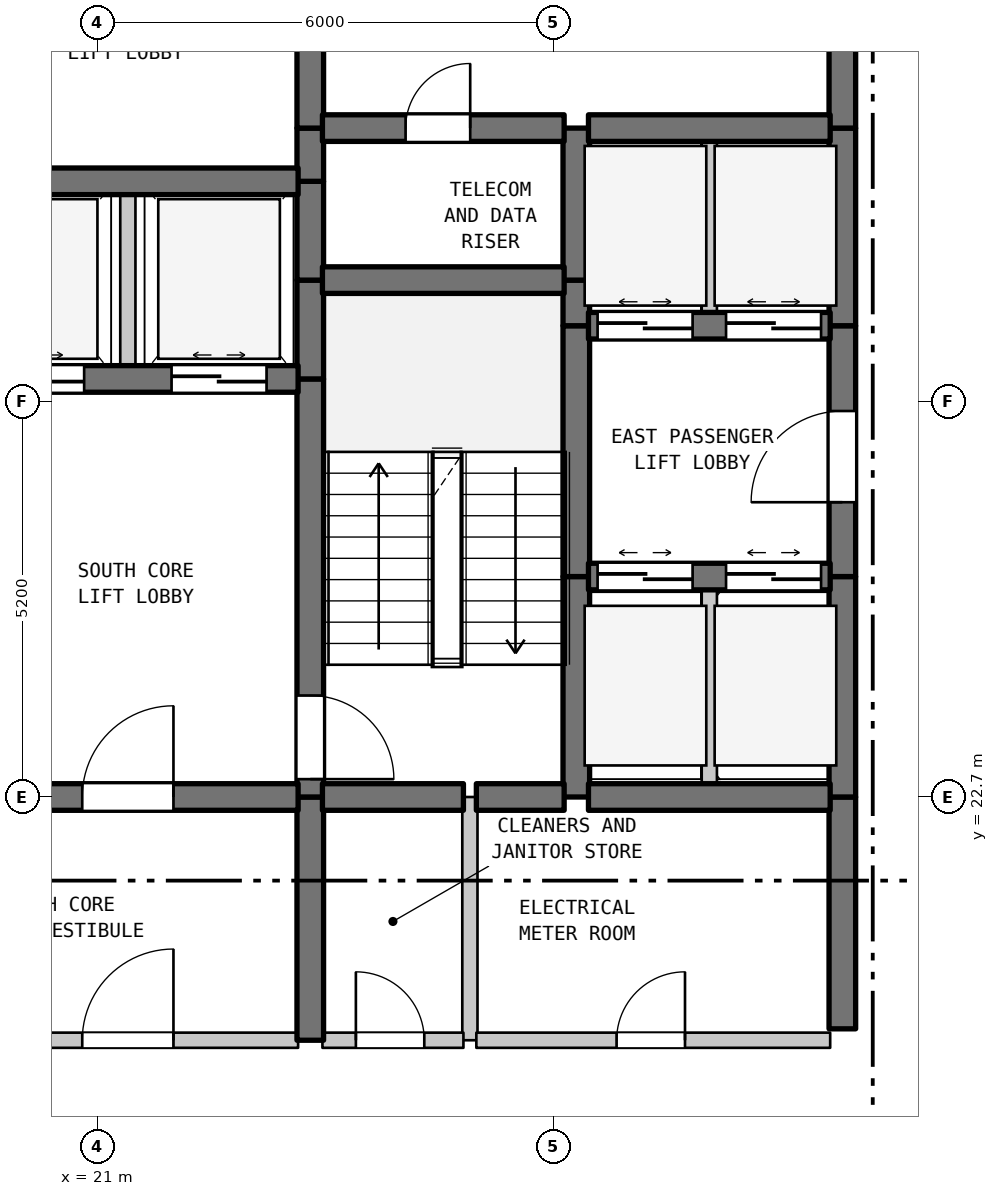
"""IFC4 building model, lengths in metres.
Left out: names, types, materials, properties, quantities, classifications, styles, units other than length and angle.
Written with IfcOpenShell. Run it as: python <this file> out.ifc"""

import sys

from ifc_helpers import new_model, si_unit, direction, frame, frame_2d, origin, place, context, subcontext, project, spatial, rectangle, extrude, element, fill, save


model = new_model("IFC4")
c1 = context("Model", 3, precision=1e-05, world=origin(), true_north=direction((0.0, 1.0)))
c2 = subcontext(c1, "Body", "Model", "MODEL_VIEW")
j1 = project(units=[si_unit("LENGTHUNIT", "METRE"), si_unit("PLANEANGLEUNIT", "RADIAN")], contexts=[c1])
p1 = place(None, origin())
s1 = spatial("IfcSite", under=j1, at=p1, CompositionType="ELEMENT")
p2 = place(p1, origin())
s2 = spatial("IfcBuilding", under=s1, at=p2, CompositionType="ELEMENT")
p3 = place(p2, frame((0.0, 0.0, 31.4)))
s3 = spatial("IfcBuildingStorey", under=s2, at=p3, CompositionType="ELEMENT", Elevation=31.4)
p4 = place(p3, frame((21.4, 28.2, 0.0), z_axis=(0.0, 0.0, 1.0), x_axis=(0.0, 1.0, 0.0)))
e1 = element("IfcWall", 1, at=p4, inside=s3, PredefinedType="STANDARD", context=c2, shape_type="SweptSolid", body=[
    extrude(rectangle(XDim=2.6, YDim=0.2, at=frame_2d((1.3, 0.0))), origin(), (0.0, 0.0, 1.0), 3.385),
])
p5 = place(p3, frame((23.8, 19.5, 0.0), z_axis=(0.0, 0.0, 1.0), x_axis=(0.0, 1.0, 0.0)))
e2 = element("IfcWall", 2, at=p5, inside=s3, PredefinedType="SHEAR", context=c2, shape_type="SweptSolid", body=[
    extrude(rectangle(XDim=3.2, YDim=0.35, at=frame_2d((1.6, 0.0))), origin(), (0.0, 0.0, 1.0), 3.385),
])
p6 = place(p3, frame((23.8, 22.7, 0.0), z_axis=(0.0, 0.0, 1.0), x_axis=(0.0, 1.0, 0.0)))
e3 = element("IfcWall", 3, at=p6, inside=s3, PredefinedType="SHEAR", context=c2, shape_type="SweptSolid", body=[
    extrude(rectangle(XDim=5.5, YDim=0.35, at=frame_2d((2.75, 0.0))), origin(), (0.0, 0.0, 1.0), 3.385),
])
p7 = place(p6, frame((0.235, 0.0, 0.0)))
e4 = element("IfcOpeningElement", 4, at=p7, cuts=e3, PredefinedType="OPENING", context=c2, shape_type="SweptSolid", body=[
    extrude(rectangle(XDim=1.1, YDim=2.15, at=frame_2d((0.55, 1.075))), frame((0.0, 0.185, 0.0), z_axis=(0.0, -1.0, 0.0), x_axis=(1.0, 0.0, 0.0)), (0.0, 0.0, 1.0), 0.37),
])
for number, where, z_axis, x_axis in (
    (5, (23.8, 28.2, 0.0), (0.0, 0.0, 1.0), (0.0, 1.0, 0.0)),
    (6, (23.8, 29.5, 0.0), (0.0, 0.0, 1.0), (0.0, 1.0, 0.0)),
):
    element("IfcWall", number, at=place(p3, frame(where, z_axis=z_axis, x_axis=x_axis)), inside=s3, PredefinedType="SHEAR", context=c2, shape_type="SweptSolid", body=[
        extrude(rectangle(XDim=1.3, YDim=0.35, at=frame_2d((0.65, 0.0))), origin(), (0.0, 0.0, 1.0), 3.385),
    ])
p8 = place(p3, frame((23.8, 30.8, 0.0), z_axis=(0.0, 0.0, 1.0), x_axis=(0.0, 1.0, 0.0)))
e7 = element("IfcWall", 7, at=p8, inside=s3, PredefinedType="SHEAR", context=c2, shape_type="SweptSolid", body=[
    extrude(rectangle(XDim=0.7, YDim=0.35, at=frame_2d((0.35, 0.0))), origin(), (0.0, 0.0, 1.0), 3.385),
])
p9 = place(p3, frame((23.8, 31.5, 0.0), z_axis=(0.0, 0.0, 1.0), x_axis=(0.0, 1.0, 0.0)))
e8 = element("IfcWall", 8, at=p9, inside=s3, PredefinedType="SHEAR", context=c2, shape_type="SweptSolid", body=[
    extrude(rectangle(XDim=3.5, YDim=0.35, at=frame_2d((1.75, 0.0))), origin(), (0.0, 0.0, 1.0), 3.385),
])
p10 = place(p9, frame((1.127, 0.0, 0.0)))
e9 = element("IfcOpeningElement", 9, at=p10, cuts=e8, PredefinedType="OPENING", context=c2, shape_type="SweptSolid", body=[
    extrude(rectangle(XDim=1.1, YDim=2.15, at=frame_2d((0.55, 1.075))), frame((0.0, 0.185, 0.0), z_axis=(0.0, -1.0, 0.0), x_axis=(1.0, 0.0, 0.0)), (0.0, 0.0, 1.0), 0.37),
])
p11 = place(p3, frame((25.9, 19.5, 0.0), z_axis=(0.0, 0.0, 1.0), x_axis=(0.0, 1.0, 0.0)))
e10 = element("IfcWall", 10, at=p11, inside=s3, PredefinedType="STANDARD", context=c2, shape_type="SweptSolid", body=[
    extrude(rectangle(XDim=3.2, YDim=0.2, at=frame_2d((1.6, 0.0))), origin(), (0.0, 0.0, 1.0), 3.385),
])
p12 = place(p3, frame((27.3, 22.7, 0.0), z_axis=(0.0, 0.0, 1.0), x_axis=(0.0, 1.0, 0.0)))
e11 = element("IfcWall", 11, at=p12, inside=s3, PredefinedType="SHEAR", context=c2, shape_type="SweptSolid", body=[
    extrude(rectangle(XDim=2.9, YDim=0.35, at=frame_2d((1.45, 0.0))), origin(), (0.0, 0.0, 1.0), 3.385),
])
p13 = place(p3, frame((27.3, 25.6, 0.0), z_axis=(0.0, 0.0, 1.0), x_axis=(0.0, 1.0, 0.0)))
e12 = element("IfcWall", 12, at=p13, inside=s3, PredefinedType="SHEAR", context=c2, shape_type="SweptSolid", body=[
    extrude(rectangle(XDim=3.3, YDim=0.35, at=frame_2d((1.65, 0.0))), origin(), (0.0, 0.0, 1.0), 3.385),
])
p14 = place(p3, frame((27.3, 28.9, 0.0), z_axis=(0.0, 0.0, 1.0), x_axis=(0.0, 1.0, 0.0)))
e13 = element("IfcWall", 13, at=p14, inside=s3, PredefinedType="SHEAR", context=c2, shape_type="SweptSolid", body=[
    extrude(rectangle(XDim=0.6, YDim=0.35, at=frame_2d((0.3, 0.0))), origin(), (0.0, 0.0, 1.0), 3.385),
])
p15 = place(p3, frame((27.3, 29.5, 0.0), z_axis=(0.0, 0.0, 1.0), x_axis=(0.0, 1.0, 0.0)))
e14 = element("IfcWall", 14, at=p15, inside=s3, PredefinedType="SHEAR", context=c2, shape_type="SweptSolid", body=[
    extrude(rectangle(XDim=2.0, YDim=0.35, at=frame_2d((1.0, 0.0))), origin(), (0.0, 0.0, 1.0), 3.385),
])
p16 = place(p3, frame((29.05, 22.7, 0.0), z_axis=(0.0, 0.0, 1.0), x_axis=(0.0, 1.0, 0.0)))
e15 = element("IfcWall", 15, at=p16, inside=s3, PredefinedType="STANDARD", context=c2, shape_type="SweptSolid", body=[
    extrude(rectangle(XDim=2.9, YDim=0.2, at=frame_2d((1.45, 0.0))), origin(), (0.0, 0.0, 1.0), 3.385),
])
p17 = place(p3, frame((29.05, 28.9, 0.0), z_axis=(0.0, 0.0, 1.0), x_axis=(0.0, 1.0, 0.0)))
e16 = element("IfcWall", 16, at=p17, inside=s3, PredefinedType="STANDARD", context=c2, shape_type="SweptSolid", body=[
    extrude(rectangle(XDim=2.6, YDim=0.2, at=frame_2d((1.3, 0.0))), origin(), (0.0, 0.0, 1.0), 3.385),
])
p18 = place(p3, frame((30.8, 19.65, 0.0), z_axis=(0.0, 0.0, 1.0), x_axis=(0.0, 1.0, 0.0)))
e17 = element("IfcWall", 17, at=p18, inside=s3, PredefinedType="SHEAR", context=c2, shape_type="SweptSolid", body=[
    extrude(rectangle(XDim=3.05, YDim=0.35, at=frame_2d((1.525, 0.0))), origin(), (0.0, 0.0, 1.0), 3.385),
])
p19 = place(p3, frame((30.8, 22.7, 0.0), z_axis=(0.0, 0.0, 1.0), x_axis=(0.0, 1.0, 0.0)))
e18 = element("IfcWall", 18, at=p19, inside=s3, PredefinedType="SHEAR", context=c2, shape_type="SweptSolid", body=[
    extrude(rectangle(XDim=2.9, YDim=0.35, at=frame_2d((1.45, 0.0))), origin(), (0.0, 0.0, 1.0), 3.385),
])
p20 = place(p3, frame((30.8, 25.6, 0.0), z_axis=(0.0, 0.0, 1.0), x_axis=(0.0, 1.0, 0.0)))
e19 = element("IfcWall", 19, at=p20, inside=s3, PredefinedType="SHEAR", context=c2, shape_type="SweptSolid", body=[
    extrude(rectangle(XDim=3.3, YDim=0.35, at=frame_2d((1.65, 0.0))), origin(), (0.0, 0.0, 1.0), 3.385),
])
p21 = place(p20, frame((0.978, 0.0, 0.0)))
e20 = element("IfcOpeningElement", 20, at=p21, cuts=e19, PredefinedType="OPENING", context=c2, shape_type="SweptSolid", body=[
    extrude(rectangle(XDim=1.2, YDim=2.2, at=frame_2d((0.6, 1.1))), frame((0.0, 0.185, 0.0), z_axis=(0.0, -1.0, 0.0), x_axis=(1.0, 0.0, 0.0)), (0.0, 0.0, 1.0), 0.37),
])
p22 = place(p3, frame((30.8, 28.9, 0.0), z_axis=(0.0, 0.0, 1.0), x_axis=(0.0, 1.0, 0.0)))
e21 = element("IfcWall", 21, at=p22, inside=s3, PredefinedType="SHEAR", context=c2, shape_type="SweptSolid", body=[
    extrude(rectangle(XDim=2.6, YDim=0.35, at=frame_2d((1.3, 0.0))), origin(), (0.0, 0.0, 1.0), 3.385),
])
p23 = place(p3, frame((30.8, 31.5, 0.0), z_axis=(0.0, 0.0, 1.0), x_axis=(0.0, 1.0, 0.0)))
e22 = element("IfcWall", 22, at=p23, inside=s3, PredefinedType="SHEAR", context=c2, shape_type="SweptSolid", body=[
    extrude(rectangle(XDim=3.5, YDim=0.35, at=frame_2d((1.75, 0.0))), origin(), (0.0, 0.0, 1.0), 3.385),
])
p24 = place(p23, frame((1.15, 0.0, 0.0)))
e23 = element("IfcOpeningElement", 23, at=p24, cuts=e22, PredefinedType="OPENING", context=c2, shape_type="SweptSolid", body=[
    extrude(rectangle(XDim=1.2, YDim=2.2, at=frame_2d((0.6, 1.1))), frame((0.0, 0.185, 0.0), z_axis=(0.0, -1.0, 0.0), x_axis=(1.0, 0.0, 0.0)), (0.0, 0.0, 1.0), 0.37),
])
p25 = place(p3, frame((19.16, 19.5, 0.0), z_axis=(0.0, 0.0, 1.0), x_axis=(1.0, 0.0, 0.0)))
e24 = element("IfcWall", 24, at=p25, inside=s3, PredefinedType="STANDARD", context=c2, shape_type="SweptSolid", body=[
    extrude(rectangle(XDim=4.48, YDim=0.2, at=frame_2d((2.24, 0.0))), origin(), (0.0, 0.0, 1.0), 3.385),
])
p26 = place(p25, frame((1.64, 0.0, 0.0)))
e25 = element("IfcOpeningElement", 25, at=p26, cuts=e24, PredefinedType="OPENING", context=c2, shape_type="SweptSolid", body=[
    extrude(rectangle(XDim=1.2, YDim=2.2, at=frame_2d((0.6, 1.1))), frame((0.0, 0.11, 0.0), z_axis=(0.0, -1.0, 0.0), x_axis=(1.0, 0.0, 0.0)), (0.0, 0.0, 1.0), 0.22),
])
p27 = place(p3, frame((23.96, 19.5, 0.0), z_axis=(0.0, 0.0, 1.0), x_axis=(1.0, 0.0, 0.0)))
e26 = element("IfcWall", 26, at=p27, inside=s3, PredefinedType="STANDARD", context=c2, shape_type="SweptSolid", body=[
    extrude(rectangle(XDim=1.855, YDim=0.2, at=frame_2d((0.927, 0.0))), origin(), (0.0, 0.0, 1.0), 3.385),
])
p28 = place(p27, frame((0.44, 0.0, 0.0)))
e27 = element("IfcOpeningElement", 27, at=p28, cuts=e26, PredefinedType="OPENING", context=c2, shape_type="SweptSolid", body=[
    extrude(rectangle(XDim=0.9, YDim=2.15, at=frame_2d((0.45, 1.075))), frame((0.0, 0.11, 0.0), z_axis=(0.0, -1.0, 0.0), x_axis=(1.0, 0.0, 0.0)), (0.0, 0.0, 1.0), 0.22),
])
p29 = place(p3, frame((25.985, 19.5, 0.0), z_axis=(0.0, 0.0, 1.0), x_axis=(1.0, 0.0, 0.0)))
e28 = element("IfcWall", 28, at=p29, inside=s3, PredefinedType="STANDARD", context=c2, shape_type="SweptSolid", body=[
    extrude(rectangle(XDim=4.655, YDim=0.2, at=frame_2d((2.327, 0.0))), origin(), (0.0, 0.0, 1.0), 3.385),
])
p30 = place(p29, frame((1.845, 0.0, 0.0)))
e29 = element("IfcOpeningElement", 29, at=p30, cuts=e28, PredefinedType="OPENING", context=c2, shape_type="SweptSolid", body=[
    extrude(rectangle(XDim=0.9, YDim=2.15, at=frame_2d((0.45, 1.075))), frame((0.0, 0.11, 0.0), z_axis=(0.0, -1.0, 0.0), x_axis=(1.0, 0.0, 0.0)), (0.0, 0.0, 1.0), 0.22),
])
p31 = place(p3, frame((19.16, 22.7, 0.0), z_axis=(0.0, 0.0, 1.0), x_axis=(1.0, 0.0, 0.0)))
e30 = element("IfcWall", 30, at=p31, inside=s3, PredefinedType="SHEAR", context=c2, shape_type="SweptSolid", body=[
    extrude(rectangle(XDim=4.48, YDim=0.35, at=frame_2d((2.24, 0.0))), origin(), (0.0, 0.0, 1.0), 3.385),
])
p32 = place(p31, frame((1.64, 0.0, 0.0)))
e31 = element("IfcOpeningElement", 31, at=p32, cuts=e30, PredefinedType="OPENING", context=c2, shape_type="SweptSolid", body=[
    extrude(rectangle(XDim=1.2, YDim=2.2, at=frame_2d((0.6, 1.1))), frame((0.0, 0.185, 0.0), z_axis=(0.0, -1.0, 0.0), x_axis=(1.0, 0.0, 0.0)), (0.0, 0.0, 1.0), 0.37),
])
p33 = place(p3, frame((23.96, 22.7, 0.0), z_axis=(0.0, 0.0, 1.0), x_axis=(1.0, 0.0, 0.0)))
e32 = element("IfcWall", 32, at=p33, inside=s3, PredefinedType="SHEAR", context=c2, shape_type="SweptSolid", body=[
    extrude(rectangle(XDim=1.855, YDim=0.35, at=frame_2d((0.927, 0.0))), origin(), (0.0, 0.0, 1.0), 3.385),
])
p34 = place(p3, frame((25.985, 22.7, 0.0), z_axis=(0.0, 0.0, 1.0), x_axis=(1.0, 0.0, 0.0)))
e33 = element("IfcWall", 33, at=p34, inside=s3, PredefinedType="SHEAR", context=c2, shape_type="SweptSolid", body=[
    extrude(rectangle(XDim=1.155, YDim=0.35, at=frame_2d((0.577, 0.0))), origin(), (0.0, 0.0, 1.0), 3.385),
])
p35 = place(p3, frame((27.46, 22.7, 0.0), z_axis=(0.0, 0.0, 1.0), x_axis=(1.0, 0.0, 0.0)))
e34 = element("IfcWall", 34, at=p35, inside=s3, PredefinedType="SHEAR", context=c2, shape_type="SweptSolid", body=[
    extrude(rectangle(XDim=3.18, YDim=0.35, at=frame_2d((1.59, 0.0))), origin(), (0.0, 0.0, 1.0), 3.385),
])
p36 = place(p3, frame((27.46, 25.6, 0.0), z_axis=(0.0, 0.0, 1.0), x_axis=(1.0, 0.0, 0.0)))
e35 = element("IfcWall", 35, at=p36, inside=s3, PredefinedType="SHEAR", context=c2, shape_type="SweptSolid", body=[
    extrude(rectangle(XDim=3.18, YDim=0.35, at=frame_2d((1.59, 0.0))), origin(), (0.0, 0.0, 1.0), 3.385),
])
p37 = place(p36, frame((0.12, 0.0, 0.0)))
e36 = element("IfcOpeningElement", 36, at=p37, cuts=e35, PredefinedType="OPENING", context=c2, shape_type="SweptSolid", body=[
    extrude(rectangle(XDim=1.25, YDim=2.2, at=frame_2d((0.625, 1.1))), frame((0.0, 0.185, 0.0), z_axis=(0.0, -1.0, 0.0), x_axis=(1.0, 0.0, 0.0)), (0.0, 0.0, 1.0), 0.37),
])
p38 = place(p36, frame((1.81, 0.0, 0.0)))
e37 = element("IfcOpeningElement", 37, at=p38, cuts=e35, PredefinedType="OPENING", context=c2, shape_type="SweptSolid", body=[
    extrude(rectangle(XDim=1.25, YDim=2.2, at=frame_2d((0.625, 1.1))), frame((0.0, 0.185, 0.0), z_axis=(0.0, -1.0, 0.0), x_axis=(1.0, 0.0, 0.0)), (0.0, 0.0, 1.0), 0.37),
])
p39 = place(p3, frame((19.16, 28.2, 0.0), z_axis=(0.0, 0.0, 1.0), x_axis=(1.0, 0.0, 0.0)))
e38 = element("IfcWall", 38, at=p39, inside=s3, PredefinedType="SHEAR", context=c2, shape_type="SweptSolid", body=[
    extrude(rectangle(XDim=4.48, YDim=0.35, at=frame_2d((2.24, 0.0))), origin(), (0.0, 0.0, 1.0), 3.385),
])
p40 = place(p39, frame((0.415, 0.0, 0.0)))
e39 = element("IfcOpeningElement", 39, at=p40, cuts=e38, PredefinedType="OPENING", context=c2, shape_type="SweptSolid", body=[
    extrude(rectangle(XDim=1.25, YDim=2.2, at=frame_2d((0.625, 1.1))), frame((0.0, 0.185, 0.0), z_axis=(0.0, -1.0, 0.0), x_axis=(1.0, 0.0, 0.0)), (0.0, 0.0, 1.0), 0.37),
])
p41 = place(p39, frame((2.815, 0.0, 0.0)))
e40 = element("IfcOpeningElement", 40, at=p41, cuts=e38, PredefinedType="OPENING", context=c2, shape_type="SweptSolid", body=[
    extrude(rectangle(XDim=1.25, YDim=2.2, at=frame_2d((0.625, 1.1))), frame((0.0, 0.185, 0.0), z_axis=(0.0, -1.0, 0.0), x_axis=(1.0, 0.0, 0.0)), (0.0, 0.0, 1.0), 0.37),
])
p42 = place(p3, frame((27.46, 28.9, 0.0), z_axis=(0.0, 0.0, 1.0), x_axis=(1.0, 0.0, 0.0)))
e41 = element("IfcWall", 41, at=p42, inside=s3, PredefinedType="SHEAR", context=c2, shape_type="SweptSolid", body=[
    extrude(rectangle(XDim=3.18, YDim=0.35, at=frame_2d((1.59, 0.0))), origin(), (0.0, 0.0, 1.0), 3.385),
])
p43 = place(p42, frame((0.12, 0.0, 0.0)))
e42 = element("IfcOpeningElement", 42, at=p43, cuts=e41, PredefinedType="OPENING", context=c2, shape_type="SweptSolid", body=[
    extrude(rectangle(XDim=1.25, YDim=2.2, at=frame_2d((0.625, 1.1))), frame((0.0, 0.185, 0.0), z_axis=(0.0, -1.0, 0.0), x_axis=(1.0, 0.0, 0.0)), (0.0, 0.0, 1.0), 0.37),
])
p44 = place(p42, frame((1.81, 0.0, 0.0)))
e43 = element("IfcOpeningElement", 43, at=p44, cuts=e41, PredefinedType="OPENING", context=c2, shape_type="SweptSolid", body=[
    extrude(rectangle(XDim=1.25, YDim=2.2, at=frame_2d((0.625, 1.1))), frame((0.0, 0.185, 0.0), z_axis=(0.0, -1.0, 0.0), x_axis=(1.0, 0.0, 0.0)), (0.0, 0.0, 1.0), 0.37),
])
p45 = place(p3, frame((23.96, 29.5, 0.0), z_axis=(0.0, 0.0, 1.0), x_axis=(1.0, 0.0, 0.0)))
e44 = element("IfcWall", 44, at=p45, inside=s3, PredefinedType="SHEAR", context=c2, shape_type="SweptSolid", body=[
    extrude(rectangle(XDim=3.18, YDim=0.35, at=frame_2d((1.59, 0.0))), origin(), (0.0, 0.0, 1.0), 3.385),
])
p46 = place(p3, frame((19.16, 30.8, 0.0), z_axis=(0.0, 0.0, 1.0), x_axis=(1.0, 0.0, 0.0)))
e45 = element("IfcWall", 45, at=p46, inside=s3, PredefinedType="SHEAR", context=c2, shape_type="SweptSolid", body=[
    extrude(rectangle(XDim=4.48, YDim=0.35, at=frame_2d((2.24, 0.0))), origin(), (0.0, 0.0, 1.0), 3.385),
])
p47 = place(p3, frame((23.96, 31.5, 0.0), z_axis=(0.0, 0.0, 1.0), x_axis=(1.0, 0.0, 0.0)))
e46 = element("IfcWall", 46, at=p47, inside=s3, PredefinedType="SHEAR", context=c2, shape_type="SweptSolid", body=[
    extrude(rectangle(XDim=3.18, YDim=0.35, at=frame_2d((1.59, 0.0))), origin(), (0.0, 0.0, 1.0), 3.385),
])
p48 = place(p47, frame((1.094, 0.0, 0.0)))
e47 = element("IfcOpeningElement", 47, at=p48, cuts=e46, PredefinedType="OPENING", context=c2, shape_type="SweptSolid", body=[
    extrude(rectangle(XDim=0.85, YDim=2.1, at=frame_2d((0.425, 1.05))), frame((0.0, 0.185, 0.0), z_axis=(0.0, -1.0, 0.0), x_axis=(1.0, 0.0, 0.0)), (0.0, 0.0, 1.0), 0.37),
])
p49 = place(p3, frame((27.46, 31.5, 0.0), z_axis=(0.0, 0.0, 1.0), x_axis=(1.0, 0.0, 0.0)))
e48 = element("IfcWall", 48, at=p49, inside=s3, PredefinedType="SHEAR", context=c2, shape_type="SweptSolid", body=[
    extrude(rectangle(XDim=3.18, YDim=0.35, at=frame_2d((1.59, 0.0))), origin(), (0.0, 0.0, 1.0), 3.385),
])
p50 = place(p7, frame((1.1, 0.0, 0.0), z_axis=(0.0, 0.0, 1.0), x_axis=(-1.0, 0.0, 0.0)))
e49 = element("IfcDoor", 49, at=p50, inside=s3, OperationType="SINGLE_SWING_LEFT", PredefinedType="DOOR", context=c2, shape_type="SweptSolid", body=[
    extrude(rectangle(XDim=1.1, YDim=2.15, at=frame_2d((0.55, 1.075))), frame((0.0, 0.025, 0.0), z_axis=(0.0, -1.0, 0.0), x_axis=(1.0, 0.0, 0.0)), (0.0, 0.0, 1.0), 0.05),
])
fill(e4, e49)
p51 = place(p21, origin())
e50 = element("IfcDoor", 50, at=p51, inside=s3, OperationType="SINGLE_SWING_LEFT", PredefinedType="DOOR", context=c2, shape_type="SweptSolid", body=[
    extrude(rectangle(XDim=1.2, YDim=2.2, at=frame_2d((0.6, 1.1))), frame((0.0, 0.025, 0.0), z_axis=(0.0, -1.0, 0.0), x_axis=(1.0, 0.0, 0.0)), (0.0, 0.0, 1.0), 0.05),
])
fill(e20, e50)
p52 = place(p26, origin())
e51 = element("IfcDoor", 51, at=p52, inside=s3, OperationType="SINGLE_SWING_RIGHT", PredefinedType="DOOR", context=c2, shape_type="SweptSolid", body=[
    extrude(rectangle(XDim=1.2, YDim=2.2, at=frame_2d((0.6, 1.1))), frame((0.0, 0.025, 0.0), z_axis=(0.0, -1.0, 0.0), x_axis=(1.0, 0.0, 0.0)), (0.0, 0.0, 1.0), 0.05),
])
fill(e25, e51)
p53 = place(p28, origin())
e52 = element("IfcDoor", 52, at=p53, inside=s3, OperationType="SINGLE_SWING_LEFT", PredefinedType="DOOR", context=c2, shape_type="SweptSolid", body=[
    extrude(rectangle(XDim=0.9, YDim=2.15, at=frame_2d((0.45, 1.075))), frame((0.0, 0.025, 0.0), z_axis=(0.0, -1.0, 0.0), x_axis=(1.0, 0.0, 0.0)), (0.0, 0.0, 1.0), 0.05),
])
fill(e27, e52)
p54 = place(p30, origin())
e53 = element("IfcDoor", 53, at=p54, inside=s3, OperationType="SINGLE_SWING_RIGHT", PredefinedType="DOOR", context=c2, shape_type="SweptSolid", body=[
    extrude(rectangle(XDim=0.9, YDim=2.15, at=frame_2d((0.45, 1.075))), frame((0.0, 0.025, 0.0), z_axis=(0.0, -1.0, 0.0), x_axis=(1.0, 0.0, 0.0)), (0.0, 0.0, 1.0), 0.05),
])
fill(e29, e53)
p55 = place(p32, origin())
e54 = element("IfcDoor", 54, at=p55, inside=s3, OperationType="SINGLE_SWING_RIGHT", PredefinedType="DOOR", context=c2, shape_type="SweptSolid", body=[
    extrude(rectangle(XDim=1.2, YDim=2.2, at=frame_2d((0.6, 1.1))), frame((0.0, 0.025, 0.0), z_axis=(0.0, -1.0, 0.0), x_axis=(1.0, 0.0, 0.0)), (0.0, 0.0, 1.0), 0.05),
])
fill(e31, e54)
p56 = place(p37, origin())
e55 = element("IfcDoor", 55, at=p56, inside=s3, OperationType="DOUBLE_DOOR_SLIDING", PredefinedType="DOOR", context=c2, shape_type="SweptSolid", body=[
    extrude(rectangle(XDim=1.25, YDim=2.2, at=frame_2d((0.625, 1.1))), frame((0.0, 0.025, 0.0), z_axis=(0.0, -1.0, 0.0), x_axis=(1.0, 0.0, 0.0)), (0.0, 0.0, 1.0), 0.05),
])
fill(e36, e55)
p57 = place(p38, origin())
e56 = element("IfcDoor", 56, at=p57, inside=s3, OperationType="DOUBLE_DOOR_SLIDING", PredefinedType="DOOR", context=c2, shape_type="SweptSolid", body=[
    extrude(rectangle(XDim=1.25, YDim=2.2, at=frame_2d((0.625, 1.1))), frame((0.0, 0.025, 0.0), z_axis=(0.0, -1.0, 0.0), x_axis=(1.0, 0.0, 0.0)), (0.0, 0.0, 1.0), 0.05),
])
fill(e37, e56)
p58 = place(p40, origin())
e57 = element("IfcDoor", 57, at=p58, inside=s3, OperationType="DOUBLE_DOOR_SLIDING", PredefinedType="DOOR", context=c2, shape_type="SweptSolid", body=[
    extrude(rectangle(XDim=1.25, YDim=2.2, at=frame_2d((0.625, 1.1))), frame((0.0, 0.025, 0.0), z_axis=(0.0, -1.0, 0.0), x_axis=(1.0, 0.0, 0.0)), (0.0, 0.0, 1.0), 0.05),
])
fill(e39, e57)
p59 = place(p41, origin())
e58 = element("IfcDoor", 58, at=p59, inside=s3, OperationType="DOUBLE_DOOR_SLIDING", PredefinedType="DOOR", context=c2, shape_type="SweptSolid", body=[
    extrude(rectangle(XDim=1.25, YDim=2.2, at=frame_2d((0.625, 1.1))), frame((0.0, 0.025, 0.0), z_axis=(0.0, -1.0, 0.0), x_axis=(1.0, 0.0, 0.0)), (0.0, 0.0, 1.0), 0.05),
])
fill(e40, e58)
p60 = place(p43, origin())
e59 = element("IfcDoor", 59, at=p60, inside=s3, OperationType="DOUBLE_DOOR_SLIDING", PredefinedType="DOOR", context=c2, shape_type="SweptSolid", body=[
    extrude(rectangle(XDim=1.25, YDim=2.2, at=frame_2d((0.625, 1.1))), frame((0.0, 0.025, 0.0), z_axis=(0.0, -1.0, 0.0), x_axis=(1.0, 0.0, 0.0)), (0.0, 0.0, 1.0), 0.05),
])
fill(e42, e59)
p61 = place(p44, origin())
e60 = element("IfcDoor", 60, at=p61, inside=s3, OperationType="DOUBLE_DOOR_SLIDING", PredefinedType="DOOR", context=c2, shape_type="SweptSolid", body=[
    extrude(rectangle(XDim=1.25, YDim=2.2, at=frame_2d((0.625, 1.1))), frame((0.0, 0.025, 0.0), z_axis=(0.0, -1.0, 0.0), x_axis=(1.0, 0.0, 0.0)), (0.0, 0.0, 1.0), 0.05),
])
fill(e43, e60)
p62 = place(p48, origin())
e61 = element("IfcDoor", 61, at=p62, inside=s3, OperationType="SINGLE_SWING_RIGHT", PredefinedType="DOOR", context=c2, shape_type="SweptSolid", body=[
    extrude(rectangle(XDim=0.85, YDim=2.1, at=frame_2d((0.425, 1.05))), frame((0.0, 0.025, 0.0), z_axis=(0.0, -1.0, 0.0), x_axis=(1.0, 0.0, 0.0)), (0.0, 0.0, 1.0), 0.05),
])
fill(e47, e61)
save(model, sys.argv[1])
